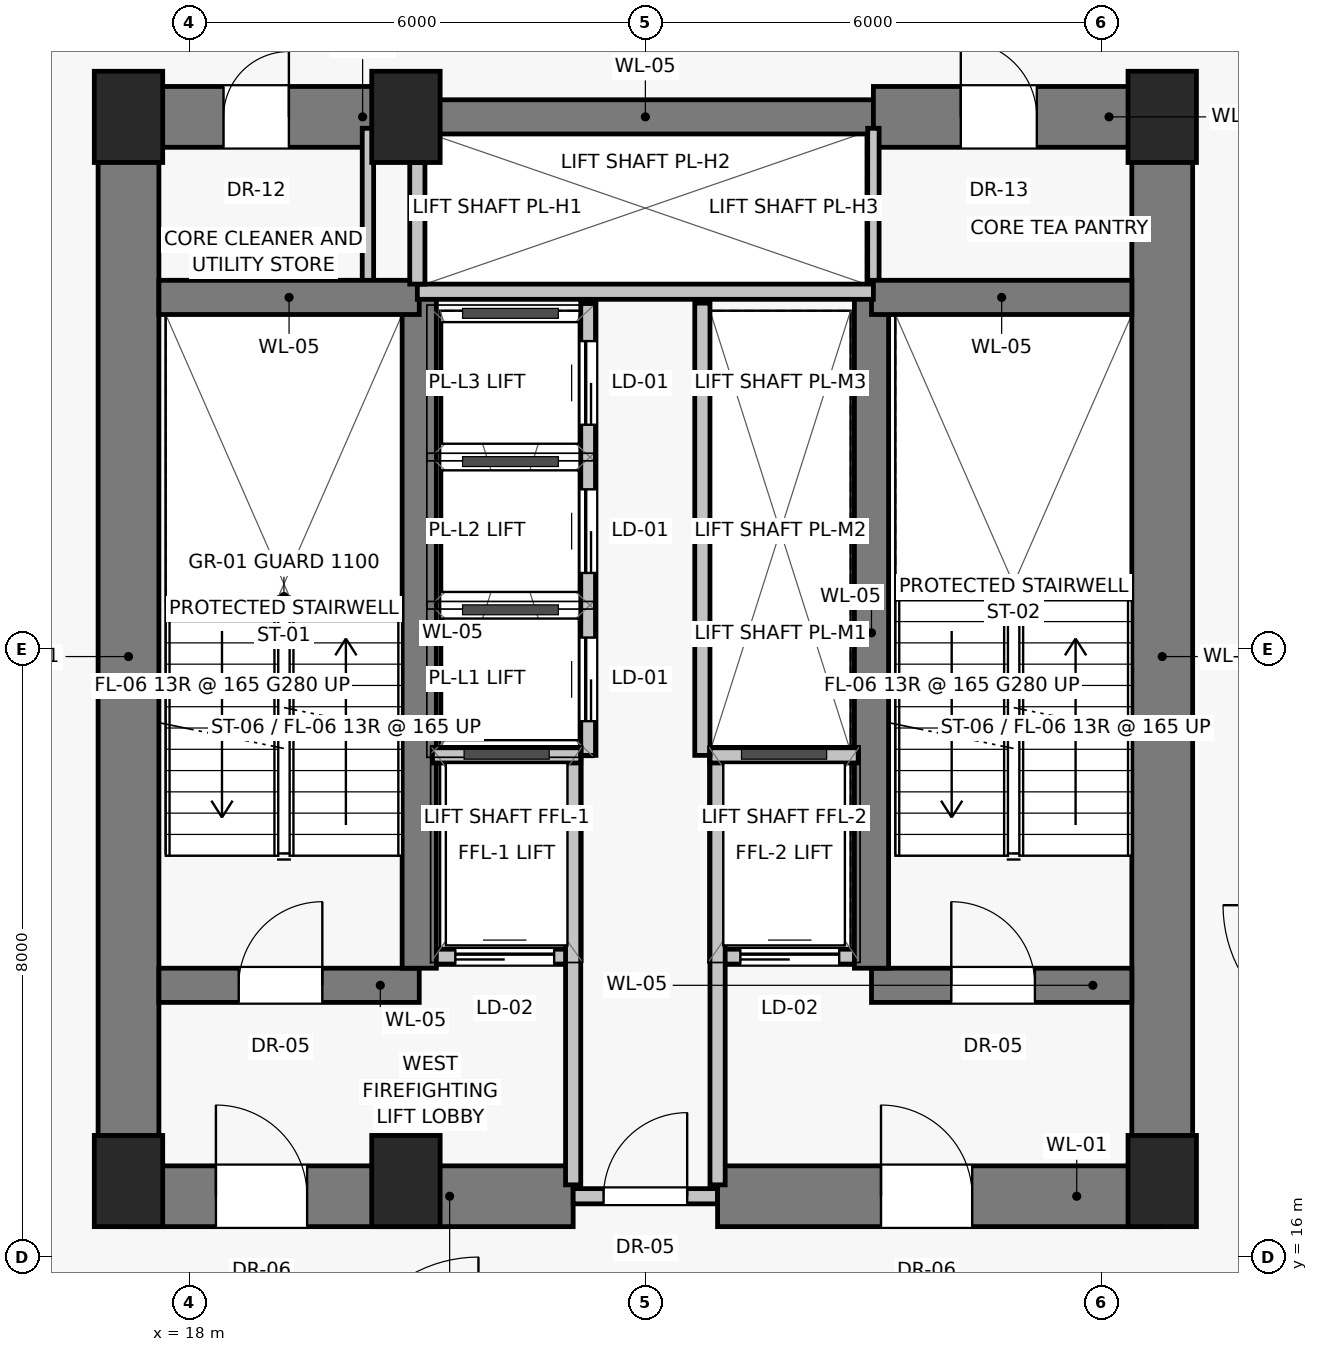
"""IFC4 building model, lengths in metres.
Left out: names, types, materials, properties, quantities, classifications, styles, units other than length and angle.
Written with IfcOpenShell. Run it as: python <this file> out.ifc"""

import sys

from ifc_helpers import new_model, si_unit, direction, frame, frame_2d, origin, origin_2d, place, context, subcontext, project, spatial, rectangle, extrude, source, transform, mapped, element, fill, save


model = new_model("IFC4")
c1 = context("Model", 3, precision=1e-05, world=origin(), true_north=direction((0.0, 1.0)))
c2 = subcontext(c1, "Body", "Model", "MODEL_VIEW")
j1 = project(units=[si_unit("LENGTHUNIT", "METRE"), si_unit("PLANEANGLEUNIT", "RADIAN")], contexts=[c1])
p1 = place(None, origin())
s1 = spatial("IfcSite", under=j1, at=p1, CompositionType="ELEMENT")
p2 = place(p1, origin())
s2 = spatial("IfcBuilding", under=s1, at=p2, CompositionType="ELEMENT")
p3 = place(p2, frame((0.0, 0.0, 56.55)))
s3 = spatial("IfcBuildingStorey", under=s2, at=p3, CompositionType="ELEMENT", Elevation=56.55)
for number, where, z_axis, x_axis in (
    (1, (17.2, 17.0, 0.0), (0.0, 0.0, 1.0), (1.0, 0.0, 0.0)),
    (2, (20.85, 17.0, 0.0), (0.0, 0.0, 1.0), (1.0, 0.0, 0.0)),
    (3, (30.8, 17.0, 0.0), (0.0, 0.0, 1.0), (1.0, 0.0, 0.0)),
    (4, (17.2, 31.0, 0.0), (0.0, 0.0, 1.0), (1.0, 0.0, 0.0)),
    (5, (20.85, 31.0, 0.0), (0.0, 0.0, 1.0), (1.0, 0.0, 0.0)),
    (6, (30.8, 31.0, 0.0), (0.0, 0.0, 1.0), (1.0, 0.0, 0.0)),
):
    element("IfcColumn", number, at=place(p3, frame(where, z_axis=z_axis, x_axis=x_axis)), inside=s3, PredefinedType="PILASTER", context=c2, shape_type="SweptSolid", body=[
        extrude(rectangle(XDim=0.9, YDim=1.2, at=origin_2d()), origin(), (0.0, 0.0, 1.0), 4.3),
    ])
for number, where, z_axis, x_axis in (
    (7, (17.2, 16.8, 0.0), (0.0, 0.0, 1.0), (0.0, 1.0, 0.0)),
    (8, (30.8, 16.8, 0.0), (0.0, 0.0, 1.0), (0.0, 1.0, 0.0)),
):
    element("IfcWall", number, at=place(p3, frame(where, z_axis=z_axis, x_axis=x_axis)), inside=s3, PredefinedType="SHEAR", context=c2, shape_type="SweptSolid", body=[
        extrude(rectangle(XDim=14.2, YDim=0.8, at=frame_2d((7.1, 0.0))), origin(), (0.0, 0.0, 1.0), 4.05),
    ])
p4 = place(p3, frame((17.2, 16.8, 0.0), z_axis=(0.0, 0.0, 1.0), x_axis=(1.0, 0.0, 0.0)))
e9 = element("IfcWall", 9, at=p4, inside=s3, PredefinedType="SHEAR", context=c2, shape_type="SweptSolid", body=[
    extrude(rectangle(XDim=5.85, YDim=0.8, at=frame_2d((2.925, 0.0))), origin(), (0.0, 0.0, 1.0), 4.05),
])
p5 = place(p4, frame((1.15, 0.0, 0.0)))
e10 = element("IfcOpeningElement", 10, at=p5, cuts=e9, PredefinedType="OPENING", context=c2, shape_type="SweptSolid", body=[
    extrude(rectangle(XDim=1.2, YDim=2.03, at=frame_2d((0.6, 1.015))), frame((0.0, 0.41, 0.0), z_axis=(0.0, -1.0, 0.0), x_axis=(1.0, 0.0, 0.0)), (0.0, 0.0, 1.0), 0.82),
])
p6 = place(p3, frame((23.05, 16.8, 0.0), z_axis=(0.0, 0.0, 1.0), x_axis=(1.0, 0.0, 0.0)))
e11 = element("IfcWall", 11, at=p6, inside=s3, PredefinedType="SOLIDWALL", context=c2, shape_type="SweptSolid", body=[
    extrude(rectangle(XDim=1.9, YDim=0.2, at=frame_2d((0.95, 0.0))), origin(), (0.0, 0.0, 1.0), 3.2),
])
p7 = place(p6, frame((0.4, 0.0, 0.0)))
e12 = element("IfcOpeningElement", 12, at=p7, cuts=e11, PredefinedType="OPENING", context=c2, shape_type="SweptSolid", body=[
    extrude(rectangle(XDim=1.1, YDim=2.03, at=frame_2d((0.55, 1.015))), frame((0.0, 0.11, 0.0), z_axis=(0.0, -1.0, 0.0), x_axis=(1.0, 0.0, 0.0)), (0.0, 0.0, 1.0), 0.22),
])
p8 = place(p3, frame((24.95, 16.8, 0.0), z_axis=(0.0, 0.0, 1.0), x_axis=(1.0, 0.0, 0.0)))
e13 = element("IfcWall", 13, at=p8, inside=s3, PredefinedType="SHEAR", context=c2, shape_type="SweptSolid", body=[
    extrude(rectangle(XDim=5.85, YDim=0.8, at=frame_2d((2.925, 0.0))), origin(), (0.0, 0.0, 1.0), 4.05),
])
p9 = place(p8, frame((2.15, 0.0, 0.0)))
e14 = element("IfcOpeningElement", 14, at=p9, cuts=e13, PredefinedType="OPENING", context=c2, shape_type="SweptSolid", body=[
    extrude(rectangle(XDim=1.2, YDim=2.03, at=frame_2d((0.6, 1.015))), frame((0.0, 0.41, 0.0), z_axis=(0.0, -1.0, 0.0), x_axis=(1.0, 0.0, 0.0)), (0.0, 0.0, 1.0), 0.82),
])
p10 = place(p3, frame((17.2, 31.0, 0.0), z_axis=(0.0, 0.0, 1.0), x_axis=(1.0, 0.0, 0.0)))
e15 = element("IfcWall", 15, at=p10, inside=s3, PredefinedType="SHEAR", context=c2, shape_type="SweptSolid", body=[
    extrude(rectangle(XDim=3.8, YDim=0.8, at=frame_2d((1.9, 0.0))), origin(), (0.0, 0.0, 1.0), 4.05),
])
p11 = place(p10, frame((1.25, 0.0, 0.0)))
e16 = element("IfcOpeningElement", 16, at=p11, cuts=e15, PredefinedType="OPENING", context=c2, shape_type="SweptSolid", body=[
    extrude(rectangle(XDim=0.86, YDim=2.01, at=frame_2d((0.43, 1.005))), frame((0.0, 0.41, 0.0), z_axis=(0.0, -1.0, 0.0), x_axis=(1.0, 0.0, 0.0)), (0.0, 0.0, 1.0), 0.82),
])
p12 = place(p3, frame((21.0, 31.0, 0.0), z_axis=(0.0, 0.0, 1.0), x_axis=(1.0, 0.0, 0.0)))
e17 = element("IfcWall", 17, at=p12, inside=s3, PredefinedType="SHEAR", context=c2, shape_type="SweptSolid", body=[
    extrude(rectangle(XDim=6.0, YDim=0.45, at=frame_2d((3.0, 0.0))), origin(), (0.0, 0.0, 1.0), 4.05),
])
p13 = place(p3, frame((27.0, 31.0, 0.0), z_axis=(0.0, 0.0, 1.0), x_axis=(1.0, 0.0, 0.0)))
e18 = element("IfcWall", 18, at=p13, inside=s3, PredefinedType="SHEAR", context=c2, shape_type="SweptSolid", body=[
    extrude(rectangle(XDim=3.8, YDim=0.8, at=frame_2d((1.9, 0.0))), origin(), (0.0, 0.0, 1.0), 4.05),
])
p14 = place(p13, frame((1.15, 0.0, 0.0)))
e19 = element("IfcOpeningElement", 19, at=p14, cuts=e18, PredefinedType="OPENING", context=c2, shape_type="SweptSolid", body=[
    extrude(rectangle(XDim=1.0, YDim=2.01, at=frame_2d((0.5, 1.005))), frame((0.0, 0.41, 0.0), z_axis=(0.0, -1.0, 0.0), x_axis=(1.0, 0.0, 0.0)), (0.0, 0.0, 1.0), 0.82),
])
for number, where, z_axis, x_axis in (
    (20, (20.35, 28.65, 0.0), (0.0, 0.0, 1.0), (0.0, 1.0, 0.0)),
    (21, (27.0, 28.65, 0.0), (0.0, 0.0, 1.0), (0.0, 1.0, 0.0)),
):
    element("IfcWall", number, at=place(p3, frame(where, z_axis=z_axis, x_axis=x_axis)), inside=s3, PredefinedType="PARTITIONING", context=c2, shape_type="SweptSolid", body=[
        extrude(rectangle(XDim=2.2, YDim=0.15, at=frame_2d((1.1, 0.0))), origin(), (0.0, 0.0, 1.0), 4.05),
    ])
p15 = place(p3, frame((17.6, 19.575, 0.0), z_axis=(0.0, 0.0, 1.0), x_axis=(1.0, 0.0, 0.0)))
e22 = element("IfcWall", 22, at=p15, inside=s3, PredefinedType="SHEAR", context=c2, shape_type="SweptSolid", body=[
    extrude(rectangle(XDim=3.425, YDim=0.45, at=frame_2d((1.712, 0.0))), origin(), (0.0, 0.0, 1.0), 4.05),
])
p16 = place(p15, frame((1.05, 0.0, 0.0)))
e23 = element("IfcOpeningElement", 23, at=p16, cuts=e22, PredefinedType="OPENING", context=c2, shape_type="SweptSolid", body=[
    extrude(rectangle(XDim=1.1, YDim=2.03, at=frame_2d((0.55, 1.015))), frame((0.0, 0.235, 0.0), z_axis=(0.0, -1.0, 0.0), x_axis=(1.0, 0.0, 0.0)), (0.0, 0.0, 1.0), 0.47),
])
p17 = place(p3, frame((21.2, 19.95, 0.0), z_axis=(0.0, 0.0, 1.0), x_axis=(1.0, 0.0, 0.0)))
e24 = element("IfcWall", 24, at=p17, inside=s3, PredefinedType="SOLIDWALL", context=c2, shape_type="SweptSolid", body=[
    extrude(rectangle(XDim=1.85, YDim=0.2, at=frame_2d((0.925, 0.0))), origin(), (0.0, 0.0, 1.0), 4.05),
])
p18 = place(p17, frame((0.3, 0.0, 0.0)))
e25 = element("IfcOpeningElement", 25, at=p18, cuts=e24, PredefinedType="OPENING", context=c2, shape_type="SweptSolid", body=[
    extrude(rectangle(XDim=1.3, YDim=2.25, at=frame_2d((0.65, 1.125))), frame((0.0, 0.11, 0.0), z_axis=(0.0, -1.0, 0.0), x_axis=(1.0, 0.0, 0.0)), (0.0, 0.0, 1.0), 0.22),
])
p19 = place(p3, frame((24.95, 19.95, 0.0), z_axis=(0.0, 0.0, 1.0), x_axis=(1.0, 0.0, 0.0)))
e26 = element("IfcWall", 26, at=p19, inside=s3, PredefinedType="SOLIDWALL", context=c2, shape_type="SweptSolid", body=[
    extrude(rectangle(XDim=1.85, YDim=0.2, at=frame_2d((0.925, 0.0))), origin(), (0.0, 0.0, 1.0), 4.05),
])
p20 = place(p19, frame((0.3, 0.0, 0.0)))
e27 = element("IfcOpeningElement", 27, at=p20, cuts=e26, PredefinedType="OPENING", context=c2, shape_type="SweptSolid", body=[
    extrude(rectangle(XDim=1.3, YDim=2.25, at=frame_2d((0.65, 1.125))), frame((0.0, 0.11, 0.0), z_axis=(0.0, -1.0, 0.0), x_axis=(1.0, 0.0, 0.0)), (0.0, 0.0, 1.0), 0.22),
])
p21 = place(p3, frame((26.975, 19.575, 0.0), z_axis=(0.0, 0.0, 1.0), x_axis=(1.0, 0.0, 0.0)))
e28 = element("IfcWall", 28, at=p21, inside=s3, PredefinedType="SHEAR", context=c2, shape_type="SweptSolid", body=[
    extrude(rectangle(XDim=3.425, YDim=0.45, at=frame_2d((1.712, 0.0))), origin(), (0.0, 0.0, 1.0), 4.05),
])
p22 = place(p21, frame((1.05, 0.0, 0.0)))
e29 = element("IfcOpeningElement", 29, at=p22, cuts=e28, PredefinedType="OPENING", context=c2, shape_type="SweptSolid", body=[
    extrude(rectangle(XDim=1.1, YDim=2.03, at=frame_2d((0.55, 1.015))), frame((0.0, 0.235, 0.0), z_axis=(0.0, -1.0, 0.0), x_axis=(1.0, 0.0, 0.0)), (0.0, 0.0, 1.0), 0.47),
])
for number, where, z_axis, x_axis in (
    (30, (21.025, 19.8, 0.0), (0.0, 0.0, 1.0), (0.0, 1.0, 0.0)),
    (31, (26.975, 19.8, 0.0), (0.0, 0.0, 1.0), (0.0, 1.0, 0.0)),
):
    element("IfcWall", number, at=place(p3, frame(where, z_axis=z_axis, x_axis=x_axis)), inside=s3, PredefinedType="SHEAR", context=c2, shape_type="SweptSolid", body=[
        extrude(rectangle(XDim=8.825, YDim=0.45, at=frame_2d((4.413, 0.0))), origin(), (0.0, 0.0, 1.0), 4.05),
    ])
for number, where, z_axis, x_axis in (
    (32, (17.6, 28.625, 0.0), (0.0, 0.0, 1.0), (1.0, 0.0, 0.0)),
    (33, (26.975, 28.625, 0.0), (0.0, 0.0, 1.0), (1.0, 0.0, 0.0)),
):
    element("IfcWall", number, at=place(p3, frame(where, z_axis=z_axis, x_axis=x_axis)), inside=s3, PredefinedType="SHEAR", context=c2, shape_type="SweptSolid", body=[
        extrude(rectangle(XDim=3.425, YDim=0.45, at=frame_2d((1.712, 0.0))), origin(), (0.0, 0.0, 1.0), 4.05),
    ])
for number, where, z_axis, x_axis in (
    (34, (23.05, 16.95, 0.0), (0.0, 0.0, 1.0), (0.0, 1.0, 0.0)),
    (35, (24.95, 16.95, 0.0), (0.0, 0.0, 1.0), (0.0, 1.0, 0.0)),
):
    element("IfcWall", number, at=place(p3, frame(where, z_axis=z_axis, x_axis=x_axis)), inside=s3, PredefinedType="SOLIDWALL", context=c2, shape_type="SweptSolid", body=[
        extrude(rectangle(XDim=5.6, YDim=0.2, at=frame_2d((2.8, 0.0))), origin(), (0.0, 0.0, 1.0), 4.05),
    ])
for number, where, z_axis, x_axis in (
    (36, (21.2, 22.6, 0.0), (0.0, 0.0, 1.0), (1.0, 0.0, 0.0)),
    (37, (24.85, 22.6, 0.0), (0.0, 0.0, 1.0), (1.0, 0.0, 0.0)),
):
    element("IfcWall", number, at=place(p3, frame(where, z_axis=z_axis, x_axis=x_axis)), inside=s3, PredefinedType="SOLIDWALL", context=c2, shape_type="SweptSolid", body=[
        extrude(rectangle(XDim=1.95, YDim=0.2, at=frame_2d((0.975, 0.0))), origin(), (0.0, 0.0, 1.0), 4.05),
    ])
p23 = place(p3, frame((21.0, 28.7, 0.0), z_axis=(0.0, 0.0, 1.0), x_axis=(1.0, 0.0, 0.0)))
e38 = element("IfcWall", 38, at=p23, inside=s3, PredefinedType="SOLIDWALL", context=c2, shape_type="SweptSolid", body=[
    extrude(rectangle(XDim=6.0, YDim=0.2, at=frame_2d((3.0, 0.0))), origin(), (0.0, 0.0, 1.0), 4.05),
])
p24 = place(p3, frame((21.0, 28.8, 0.0), z_axis=(0.0, 0.0, 1.0), x_axis=(0.0, 1.0, 0.0)))
e39 = element("IfcWall", 39, at=p24, inside=s3, PredefinedType="SOLIDWALL", context=c2, shape_type="SweptSolid", body=[
    extrude(rectangle(XDim=1.6, YDim=0.2, at=frame_2d((0.8, 0.0))), origin(), (0.0, 0.0, 1.0), 4.05),
])
p25 = place(p3, frame((23.25, 22.6, 0.0), z_axis=(0.0, 0.0, 1.0), x_axis=(0.0, 1.0, 0.0)))
e40 = element("IfcWall", 40, at=p25, inside=s3, PredefinedType="SOLIDWALL", context=c2, shape_type="SweptSolid", body=[
    extrude(rectangle(XDim=5.95, YDim=0.2, at=frame_2d((2.975, 0.0))), origin(), (0.0, 0.0, 1.0), 4.05),
])
p26 = place(p25, frame((0.45, 0.0, 0.0)))
e41 = element("IfcOpeningElement", 41, at=p26, cuts=e40, PredefinedType="OPENING", context=c2, shape_type="SweptSolid", body=[
    extrude(rectangle(XDim=1.1, YDim=2.08, at=frame_2d((0.55, 1.04))), frame((0.0, 0.11, 0.0), z_axis=(0.0, -1.0, 0.0), x_axis=(1.0, 0.0, 0.0)), (0.0, 0.0, 1.0), 0.22),
])
p27 = place(p25, frame((2.4, 0.0, 0.0)))
e42 = element("IfcOpeningElement", 42, at=p27, cuts=e40, PredefinedType="OPENING", context=c2, shape_type="SweptSolid", body=[
    extrude(rectangle(XDim=1.1, YDim=2.08, at=frame_2d((0.55, 1.04))), frame((0.0, 0.11, 0.0), z_axis=(0.0, -1.0, 0.0), x_axis=(1.0, 0.0, 0.0)), (0.0, 0.0, 1.0), 0.22),
])
p28 = place(p25, frame((4.35, 0.0, 0.0)))
e43 = element("IfcOpeningElement", 43, at=p28, cuts=e40, PredefinedType="OPENING", context=c2, shape_type="SweptSolid", body=[
    extrude(rectangle(XDim=1.1, YDim=2.08, at=frame_2d((0.55, 1.04))), frame((0.0, 0.11, 0.0), z_axis=(0.0, -1.0, 0.0), x_axis=(1.0, 0.0, 0.0)), (0.0, 0.0, 1.0), 0.22),
])
p29 = place(p3, frame((24.75, 22.6, 0.0), z_axis=(0.0, 0.0, 1.0), x_axis=(0.0, 1.0, 0.0)))
e44 = element("IfcWall", 44, at=p29, inside=s3, PredefinedType="SOLIDWALL", context=c2, shape_type="SweptSolid", body=[
    extrude(rectangle(XDim=5.95, YDim=0.2, at=frame_2d((2.975, 0.0))), origin(), (0.0, 0.0, 1.0), 4.05),
])
m1 = source(origin(), c2, "Body", "SweptSolid", [
    extrude(rectangle(XDim=1.2, YDim=2.03, at=frame_2d((0.6, 1.015))), frame((0.0, 0.025, 0.0), z_axis=(0.0, -1.0, 0.0), x_axis=(1.0, 0.0, 0.0)), (0.0, 0.0, 1.0), 0.05),
])
p30 = place(p5, origin())
e45 = element("IfcDoor", 45, at=p30, inside=s3, OperationType="SINGLE_SWING_LEFT", PredefinedType="DOOR", context=c2, shape_type="MappedRepresentation", body=[
    mapped(m1, transform((0.0, 0.0, 0.0), scale=1.0)),
])
fill(e10, e45)
m2 = source(origin(), c2, "Body", "SweptSolid", [
    extrude(rectangle(XDim=1.1, YDim=2.03, at=frame_2d((0.55, 1.015))), frame((0.0, 0.025, 0.0), z_axis=(0.0, -1.0, 0.0), x_axis=(1.0, 0.0, 0.0)), (0.0, 0.0, 1.0), 0.05),
])
p31 = place(p7, origin())
e46 = element("IfcDoor", 46, at=p31, inside=s3, OperationType="SINGLE_SWING_RIGHT", PredefinedType="DOOR", context=c2, shape_type="MappedRepresentation", body=[
    mapped(m2, transform((0.0, 0.0, 0.0), scale=1.0)),
])
fill(e12, e46)
p32 = place(p9, origin())
e47 = element("IfcDoor", 47, at=p32, inside=s3, OperationType="SINGLE_SWING_LEFT", PredefinedType="DOOR", context=c2, shape_type="MappedRepresentation", body=[
    mapped(m1, transform((0.0, 0.0, 0.0), scale=1.0)),
])
fill(e14, e47)
m3 = source(origin(), c2, "Body", "SweptSolid", [
    extrude(rectangle(XDim=0.86, YDim=2.01, at=frame_2d((0.43, 1.005))), frame((0.0, 0.025, 0.0), z_axis=(0.0, -1.0, 0.0), x_axis=(1.0, 0.0, 0.0)), (0.0, 0.0, 1.0), 0.05),
])
p33 = place(p11, origin())
e48 = element("IfcDoor", 48, at=p33, inside=s3, OperationType="SINGLE_SWING_RIGHT", PredefinedType="DOOR", context=c2, shape_type="MappedRepresentation", body=[
    mapped(m3, transform((0.0, 0.0, 0.0), scale=1.0)),
])
fill(e16, e48)
m4 = source(origin(), c2, "Body", "SweptSolid", [
    extrude(rectangle(XDim=1.0, YDim=2.01, at=frame_2d((0.5, 1.005))), frame((0.0, 0.025, 0.0), z_axis=(0.0, -1.0, 0.0), x_axis=(1.0, 0.0, 0.0)), (0.0, 0.0, 1.0), 0.05),
])
p34 = place(p14, origin())
e49 = element("IfcDoor", 49, at=p34, inside=s3, OperationType="SINGLE_SWING_LEFT", PredefinedType="DOOR", context=c2, shape_type="MappedRepresentation", body=[
    mapped(m4, transform((0.0, 0.0, 0.0), scale=1.0)),
])
fill(e19, e49)
p35 = place(p16, origin())
e50 = element("IfcDoor", 50, at=p35, inside=s3, OperationType="SINGLE_SWING_RIGHT", PredefinedType="DOOR", context=c2, shape_type="MappedRepresentation", body=[
    mapped(m2, transform((0.0, 0.0, 0.0), scale=1.0)),
])
fill(e23, e50)
m5 = source(origin(), c2, "Body", "SweptSolid", [
    extrude(rectangle(XDim=1.3, YDim=2.25, at=frame_2d((0.65, 1.125))), frame((0.0, 0.025, 0.0), z_axis=(0.0, -1.0, 0.0), x_axis=(1.0, 0.0, 0.0)), (0.0, 0.0, 1.0), 0.05),
])
p36 = place(p18, origin())
e51 = element("IfcDoor", 51, at=p36, inside=s3, OperationType="SLIDING_TO_LEFT", PredefinedType="DOOR", context=c2, shape_type="MappedRepresentation", body=[
    mapped(m5, transform((0.0, 0.0, 0.0), scale=1.0)),
])
fill(e25, e51)
p37 = place(p20, origin())
e52 = element("IfcDoor", 52, at=p37, inside=s3, OperationType="SLIDING_TO_LEFT", PredefinedType="DOOR", context=c2, shape_type="MappedRepresentation", body=[
    mapped(m5, transform((0.0, 0.0, 0.0), scale=1.0)),
])
fill(e27, e52)
p38 = place(p22, origin())
e53 = element("IfcDoor", 53, at=p38, inside=s3, OperationType="SINGLE_SWING_LEFT", PredefinedType="DOOR", context=c2, shape_type="MappedRepresentation", body=[
    mapped(m2, transform((0.0, 0.0, 0.0), scale=1.0)),
])
fill(e29, e53)
m6 = source(origin(), c2, "Body", "SweptSolid", [
    extrude(rectangle(XDim=1.1, YDim=2.08, at=frame_2d((0.55, 1.04))), frame((0.0, 0.025, 0.0), z_axis=(0.0, -1.0, 0.0), x_axis=(1.0, 0.0, 0.0)), (0.0, 0.0, 1.0), 0.05),
])
p39 = place(p26, origin())
e54 = element("IfcDoor", 54, at=p39, inside=s3, OperationType="SLIDING_TO_LEFT", PredefinedType="DOOR", context=c2, shape_type="MappedRepresentation", body=[
    mapped(m6, transform((0.0, 0.0, 0.0), scale=1.0)),
])
fill(e41, e54)
p40 = place(p27, origin())
e55 = element("IfcDoor", 55, at=p40, inside=s3, OperationType="SLIDING_TO_LEFT", PredefinedType="DOOR", context=c2, shape_type="MappedRepresentation", body=[
    mapped(m6, transform((0.0, 0.0, 0.0), scale=1.0)),
])
fill(e42, e55)
p41 = place(p28, origin())
e56 = element("IfcDoor", 56, at=p41, inside=s3, OperationType="SLIDING_TO_LEFT", PredefinedType="DOOR", context=c2, shape_type="MappedRepresentation", body=[
    mapped(m6, transform((0.0, 0.0, 0.0), scale=1.0)),
])
fill(e43, e56)
save(model, sys.argv[1])
